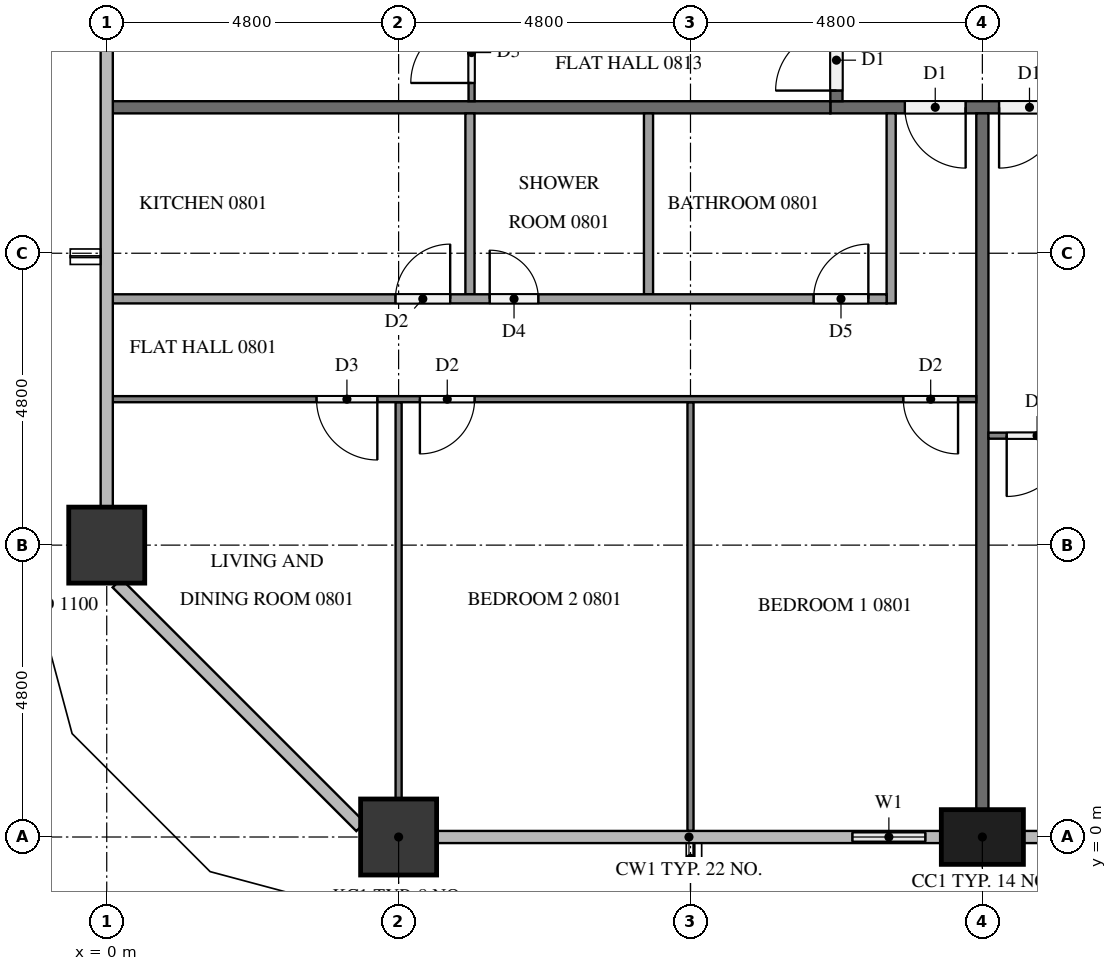
"""IFC4 building model, lengths in metres.
Left out: names, types, materials, properties, quantities, classifications, styles, units other than length and angle.
Written with IfcOpenShell. Run it as: python <this file> out.ifc"""

import sys

from ifc_helpers import new_model, si_unit, direction, frame, frame_2d, origin, origin_2d, place, context, subcontext, project, spatial, rectangle, extrude, element, fill, save


model = new_model("IFC4")
c1 = context("Model", 3, precision=1e-05, world=origin(), true_north=direction((0.0, 1.0)))
c2 = subcontext(c1, "Body", "Model", "MODEL_VIEW")
j1 = project(units=[si_unit("LENGTHUNIT", "METRE"), si_unit("PLANEANGLEUNIT", "RADIAN")], contexts=[c1])
p1 = place(None, origin())
s1 = spatial("IfcSite", under=j1, at=p1, CompositionType="ELEMENT")
p2 = place(p1, origin())
s2 = spatial("IfcBuilding", under=s1, at=p2, CompositionType="ELEMENT")
p3 = place(p2, frame((0.0, 0.0, 36.4)))
s3 = spatial("IfcBuildingStorey", under=s2, at=p3, CompositionType="ELEMENT", Elevation=36.4)
p4 = place(p3, frame((4.8, 0.0, 0.0), z_axis=(0.0, 0.0, 1.0), x_axis=(1.0, 0.0, 0.0)))
e1 = element("IfcColumn", 1, at=p4, inside=s3, PredefinedType="COLUMN", context=c2, shape_type="SweptSolid", body=[
    extrude(rectangle(XDim=1.25, YDim=1.25, at=origin_2d()), origin(), (0.0, 0.0, 1.0), 3.2),
])
p5 = place(p3, frame((14.4, 0.0, 0.0), z_axis=(0.0, 0.0, 1.0), x_axis=(1.0, 0.0, 0.0)))
e2 = element("IfcColumn", 2, at=p5, inside=s3, PredefinedType="COLUMN", context=c2, shape_type="SweptSolid", body=[
    extrude(rectangle(XDim=1.35, YDim=0.9, at=origin_2d()), origin(), (0.0, 0.0, 1.0), 3.2),
])
p6 = place(p3, frame((0.0, 4.8, 0.0), z_axis=(0.0, 0.0, 1.0), x_axis=(1.0, 0.0, 0.0)))
e3 = element("IfcColumn", 3, at=p6, inside=s3, PredefinedType="COLUMN", context=c2, shape_type="SweptSolid", body=[
    extrude(rectangle(XDim=1.25, YDim=1.25, at=origin_2d()), origin(), (0.0, 0.0, 1.0), 3.2),
])
p7 = place(p3, frame((12.0, 0.0, 0.0), z_axis=(0.0, 0.0, 1.0), x_axis=(1.0, 0.0, 0.0)))
e4 = element("IfcWall", 4, at=p7, inside=s3, PredefinedType="SOLIDWALL", context=c2, shape_type="SweptSolid", body=[
    extrude(rectangle(XDim=1.725, YDim=0.15, at=frame_2d((0.863, 0.0))), origin(), (0.0, 0.0, 1.0), 3.2),
])
p8 = place(p7, frame((0.262, 0.0, 0.9)))
e5 = element("IfcOpeningElement", 5, at=p8, cuts=e4, PredefinedType="OPENING", context=c2, shape_type="SweptSolid", body=[
    extrude(rectangle(XDim=1.2, YDim=1.4, at=frame_2d((0.6, 0.7))), frame((0.0, 0.085, 0.0), z_axis=(0.0, -1.0, 0.0), x_axis=(1.0, 0.0, 0.0)), (0.0, 0.0, 1.0), 0.17),
])
p9 = place(p3, frame((50.5, 12.0, 0.0), z_axis=(0.0, 0.0, 1.0), x_axis=(-1.0, 0.0, 0.0)))
e6 = element("IfcWall", 6, at=p9, inside=s3, PredefinedType="PARTITIONING", context=c2, shape_type="SweptSolid", body=[
    extrude(rectangle(XDim=38.6, YDim=0.2, at=frame_2d((19.3, 0.0))), origin(), (0.0, 0.0, 1.0), 3.2),
])
p10 = place(p9, frame((36.375, 0.0, 0.0)))
e7 = element("IfcOpeningElement", 7, at=p10, cuts=e6, PredefinedType="OPENING", context=c2, shape_type="SweptSolid", body=[
    extrude(rectangle(XDim=1.0, YDim=2.1, at=frame_2d((0.5, 1.05))), frame((0.0, 0.11, 0.0), z_axis=(0.0, -1.0, 0.0), x_axis=(1.0, 0.0, 0.0)), (0.0, 0.0, 1.0), 0.22),
])
p11 = place(p9, frame((34.825, 0.0, 0.0)))
e8 = element("IfcOpeningElement", 8, at=p11, cuts=e6, PredefinedType="OPENING", context=c2, shape_type="SweptSolid", body=[
    extrude(rectangle(XDim=1.0, YDim=2.1, at=frame_2d((0.5, 1.05))), frame((0.0, 0.11, 0.0), z_axis=(0.0, -1.0, 0.0), x_axis=(1.0, 0.0, 0.0)), (0.0, 0.0, 1.0), 0.22),
])
p12 = place(p9, frame((22.825, 0.0, 0.0)))
e9 = element("IfcOpeningElement", 9, at=p12, cuts=e6, PredefinedType="OPENING", context=c2, shape_type="SweptSolid", body=[
    extrude(rectangle(XDim=1.0, YDim=2.1, at=frame_2d((0.5, 1.05))), frame((0.0, 0.11, 0.0), z_axis=(0.0, -1.0, 0.0), x_axis=(1.0, 0.0, 0.0)), (0.0, 0.0, 1.0), 0.22),
])
p13 = place(p9, frame((8.425, 0.0, 0.0)))
e10 = element("IfcOpeningElement", 10, at=p13, cuts=e6, PredefinedType="OPENING", context=c2, shape_type="SweptSolid", body=[
    extrude(rectangle(XDim=1.0, YDim=2.1, at=frame_2d((0.5, 1.05))), frame((0.0, 0.11, 0.0), z_axis=(0.0, -1.0, 0.0), x_axis=(1.0, 0.0, 0.0)), (0.0, 0.0, 1.0), 0.22),
])
p14 = place(p9, frame((1.225, 0.0, 0.0)))
e11 = element("IfcOpeningElement", 11, at=p14, cuts=e6, PredefinedType="OPENING", context=c2, shape_type="SweptSolid", body=[
    extrude(rectangle(XDim=1.0, YDim=2.1, at=frame_2d((0.5, 1.05))), frame((0.0, 0.11, 0.0), z_axis=(0.0, -1.0, 0.0), x_axis=(1.0, 0.0, 0.0)), (0.0, 0.0, 1.0), 0.22),
])
p15 = place(p3, frame((12.0, 12.1, 0.0), z_axis=(0.0, 0.0, 1.0), x_axis=(0.0, 1.0, 0.0)))
e12 = element("IfcWall", 12, at=p15, inside=s3, PredefinedType="PARTITIONING", context=c2, shape_type="SweptSolid", body=[
    extrude(rectangle(XDim=28.6, YDim=0.2, at=frame_2d((14.3, 0.0))), origin(), (0.0, 0.0, 1.0), 3.2),
])
p16 = place(p15, frame((16.975, 0.0, 0.0)))
e13 = element("IfcOpeningElement", 13, at=p16, cuts=e12, PredefinedType="OPENING", context=c2, shape_type="SweptSolid", body=[
    extrude(rectangle(XDim=1.0, YDim=2.1, at=frame_2d((0.5, 1.05))), frame((0.0, 0.11, 0.0), z_axis=(0.0, -1.0, 0.0), x_axis=(1.0, 0.0, 0.0)), (0.0, 0.0, 1.0), 0.22),
])
p17 = place(p15, frame((0.175, 0.0, 0.0)))
e14 = element("IfcOpeningElement", 14, at=p17, cuts=e12, PredefinedType="OPENING", context=c2, shape_type="SweptSolid", body=[
    extrude(rectangle(XDim=1.0, YDim=2.1, at=frame_2d((0.5, 1.05))), frame((0.0, 0.11, 0.0), z_axis=(0.0, -1.0, 0.0), x_axis=(1.0, 0.0, 0.0)), (0.0, 0.0, 1.0), 0.22),
])
p18 = place(p3, frame((14.4, 11.9, 0.0), z_axis=(0.0, 0.0, 1.0), x_axis=(0.0, -1.0, 0.0)))
e15 = element("IfcWall", 15, at=p18, inside=s3, PredefinedType="PARTITIONING", context=c2, shape_type="SweptSolid", body=[
    extrude(rectangle(XDim=11.45, YDim=0.2, at=frame_2d((5.725, 0.0))), origin(), (0.0, 0.0, 1.0), 3.2),
])
p19 = place(p3, frame((0.1, 12.0, 0.0), z_axis=(0.0, 0.0, 1.0), x_axis=(1.0, 0.0, 0.0)))
e16 = element("IfcWall", 16, at=p19, inside=s3, PredefinedType="PARTITIONING", context=c2, shape_type="SweptSolid", body=[
    extrude(rectangle(XDim=11.8, YDim=0.2, at=frame_2d((5.9, 0.0))), origin(), (0.0, 0.0, 1.0), 3.2),
])
p20 = place(p3, frame((9.6, 7.15, 0.0), z_axis=(0.0, 0.0, 1.0), x_axis=(0.0, -1.0, 0.0)))
e17 = element("IfcWall", 17, at=p20, inside=s3, PredefinedType="PARTITIONING", context=c2, shape_type="SweptSolid", body=[
    extrude(rectangle(XDim=7.05, YDim=0.1, at=frame_2d((3.525, 0.0))), origin(), (0.0, 0.0, 1.0), 3.2),
])
p21 = place(p3, frame((4.8, 7.15, 0.0), z_axis=(0.0, 0.0, 1.0), x_axis=(0.0, -1.0, 0.0)))
e18 = element("IfcWall", 18, at=p21, inside=s3, PredefinedType="PARTITIONING", context=c2, shape_type="SweptSolid", body=[
    extrude(rectangle(XDim=6.525, YDim=0.1, at=frame_2d((3.262, 0.0))), origin(), (0.0, 0.0, 1.0), 3.2),
])
p22 = place(p3, frame((14.3, 7.2, 0.0), z_axis=(0.0, 0.0, 1.0), x_axis=(-1.0, 0.0, 0.0)))
e19 = element("IfcWall", 19, at=p22, inside=s3, PredefinedType="PARTITIONING", context=c2, shape_type="SweptSolid", body=[
    extrude(rectangle(XDim=14.2, YDim=0.1, at=frame_2d((7.1, 0.0))), origin(), (0.0, 0.0, 1.0), 3.2),
])
p23 = place(p22, frame((0.3, 0.0, 0.0)))
e20 = element("IfcOpeningElement", 20, at=p23, cuts=e19, PredefinedType="OPENING", context=c2, shape_type="SweptSolid", body=[
    extrude(rectangle(XDim=0.9, YDim=2.1, at=frame_2d((0.45, 1.05))), frame((0.0, 0.06, 0.0), z_axis=(0.0, -1.0, 0.0), x_axis=(1.0, 0.0, 0.0)), (0.0, 0.0, 1.0), 0.12),
])
p24 = place(p22, frame((8.25, 0.0, 0.0)))
e21 = element("IfcOpeningElement", 21, at=p24, cuts=e19, PredefinedType="OPENING", context=c2, shape_type="SweptSolid", body=[
    extrude(rectangle(XDim=0.9, YDim=2.1, at=frame_2d((0.45, 1.05))), frame((0.0, 0.06, 0.0), z_axis=(0.0, -1.0, 0.0), x_axis=(1.0, 0.0, 0.0)), (0.0, 0.0, 1.0), 0.12),
])
p25 = place(p22, frame((9.85, 0.0, 0.0)))
e22 = element("IfcOpeningElement", 22, at=p25, cuts=e19, PredefinedType="OPENING", context=c2, shape_type="SweptSolid", body=[
    extrude(rectangle(XDim=1.0, YDim=2.1, at=frame_2d((0.5, 1.05))), frame((0.0, 0.06, 0.0), z_axis=(0.0, -1.0, 0.0), x_axis=(1.0, 0.0, 0.0)), (0.0, 0.0, 1.0), 0.12),
])
for number, where, z_axis, x_axis in (
    (23, (8.91, 11.9, 0.0), (0.0, 0.0, 1.0), (0.0, -1.0, 0.0)),
    (24, (5.973, 11.9, 0.0), (0.0, 0.0, 1.0), (0.0, -1.0, 0.0)),
):
    element("IfcWall", number, at=place(p3, frame(where, z_axis=z_axis, x_axis=x_axis)), inside=s3, PredefinedType="PARTITIONING", context=c2, shape_type="SweptSolid", body=[
        extrude(rectangle(XDim=2.975, YDim=0.15, at=frame_2d((1.487, 0.0))), origin(), (0.0, 0.0, 1.0), 3.2),
    ])
p26 = place(p3, frame((12.9, 11.9, 0.0), z_axis=(0.0, 0.0, 1.0), x_axis=(0.0, -1.0, 0.0)))
e25 = element("IfcWall", 25, at=p26, inside=s3, PredefinedType="PARTITIONING", context=c2, shape_type="SweptSolid", body=[
    extrude(rectangle(XDim=3.125, YDim=0.15, at=frame_2d((1.562, 0.0))), origin(), (0.0, 0.0, 1.0), 3.2),
])
p27 = place(p3, frame((0.1, 8.85, 0.0), z_axis=(0.0, 0.0, 1.0), x_axis=(1.0, 0.0, 0.0)))
e26 = element("IfcWall", 26, at=p27, inside=s3, PredefinedType="PARTITIONING", context=c2, shape_type="SweptSolid", body=[
    extrude(rectangle(XDim=12.725, YDim=0.15, at=frame_2d((6.362, 0.0))), origin(), (0.0, 0.0, 1.0), 3.2),
])
p28 = place(p27, frame((11.525, 0.0, 0.0)))
e27 = element("IfcOpeningElement", 27, at=p28, cuts=e26, PredefinedType="OPENING", context=c2, shape_type="SweptSolid", body=[
    extrude(rectangle(XDim=0.9, YDim=2.1, at=frame_2d((0.45, 1.05))), frame((0.0, 0.085, 0.0), z_axis=(0.0, -1.0, 0.0), x_axis=(1.0, 0.0, 0.0)), (0.0, 0.0, 1.0), 0.17),
])
p29 = place(p27, frame((6.198, 0.0, 0.0)))
e28 = element("IfcOpeningElement", 28, at=p29, cuts=e26, PredefinedType="OPENING", context=c2, shape_type="SweptSolid", body=[
    extrude(rectangle(XDim=0.8, YDim=2.1, at=frame_2d((0.4, 1.05))), frame((0.0, 0.085, 0.0), z_axis=(0.0, -1.0, 0.0), x_axis=(1.0, 0.0, 0.0)), (0.0, 0.0, 1.0), 0.17),
])
p30 = place(p27, frame((4.648, 0.0, 0.0)))
e29 = element("IfcOpeningElement", 29, at=p30, cuts=e26, PredefinedType="OPENING", context=c2, shape_type="SweptSolid", body=[
    extrude(rectangle(XDim=0.9, YDim=2.1, at=frame_2d((0.45, 1.05))), frame((0.0, 0.085, 0.0), z_axis=(0.0, -1.0, 0.0), x_axis=(1.0, 0.0, 0.0)), (0.0, 0.0, 1.0), 0.17),
])
p31 = place(p3, frame((26.3, 6.6, 0.0), z_axis=(0.0, 0.0, 1.0), x_axis=(-1.0, 0.0, 0.0)))
e30 = element("IfcWall", 30, at=p31, inside=s3, PredefinedType="PARTITIONING", context=c2, shape_type="SweptSolid", body=[
    extrude(rectangle(XDim=11.8, YDim=0.1, at=frame_2d((5.9, 0.0))), origin(), (0.0, 0.0, 1.0), 3.2),
])
p32 = place(p31, frame((10.5, 0.0, 0.0)))
e31 = element("IfcOpeningElement", 31, at=p32, cuts=e30, PredefinedType="OPENING", context=c2, shape_type="SweptSolid", body=[
    extrude(rectangle(XDim=1.0, YDim=2.1, at=frame_2d((0.5, 1.05))), frame((0.0, 0.06, 0.0), z_axis=(0.0, -1.0, 0.0), x_axis=(1.0, 0.0, 0.0)), (0.0, 0.0, 1.0), 0.12),
])
p33 = place(p31, frame((0.3, 0.0, 0.0)))
e32 = element("IfcOpeningElement", 32, at=p33, cuts=e30, PredefinedType="OPENING", context=c2, shape_type="SweptSolid", body=[
    extrude(rectangle(XDim=0.9, YDim=2.1, at=frame_2d((0.45, 1.05))), frame((0.0, 0.06, 0.0), z_axis=(0.0, -1.0, 0.0), x_axis=(1.0, 0.0, 0.0)), (0.0, 0.0, 1.0), 0.12),
])
p34 = place(p3, frame((6.0, 12.1, 0.0), z_axis=(0.0, 0.0, 1.0), x_axis=(0.0, 1.0, 0.0)))
e33 = element("IfcWall", 33, at=p34, inside=s3, PredefinedType="PARTITIONING", context=c2, shape_type="SweptSolid", body=[
    extrude(rectangle(XDim=16.6, YDim=0.1, at=frame_2d((8.3, 0.0))), origin(), (0.0, 0.0, 1.0), 3.2),
])
p35 = place(p34, frame((0.3, 0.0, 0.0)))
e34 = element("IfcOpeningElement", 34, at=p35, cuts=e33, PredefinedType="OPENING", context=c2, shape_type="SweptSolid", body=[
    extrude(rectangle(XDim=1.0, YDim=2.1, at=frame_2d((0.5, 1.05))), frame((0.0, 0.06, 0.0), z_axis=(0.0, -1.0, 0.0), x_axis=(1.0, 0.0, 0.0)), (0.0, 0.0, 1.0), 0.12),
])
p36 = place(p34, frame((10.65, 0.0, 0.0)))
e35 = element("IfcOpeningElement", 35, at=p36, cuts=e33, PredefinedType="OPENING", context=c2, shape_type="SweptSolid", body=[
    extrude(rectangle(XDim=0.9, YDim=2.1, at=frame_2d((0.45, 1.05))), frame((0.0, 0.06, 0.0), z_axis=(0.0, -1.0, 0.0), x_axis=(1.0, 0.0, 0.0)), (0.0, 0.0, 1.0), 0.12),
])
p37 = place(p34, frame((12.25, 0.0, 0.0)))
e36 = element("IfcOpeningElement", 36, at=p37, cuts=e33, PredefinedType="OPENING", context=c2, shape_type="SweptSolid", body=[
    extrude(rectangle(XDim=0.9, YDim=2.1, at=frame_2d((0.45, 1.05))), frame((0.0, 0.06, 0.0), z_axis=(0.0, -1.0, 0.0), x_axis=(1.0, 0.0, 0.0)), (0.0, 0.0, 1.0), 0.12),
])
p38 = place(p8, origin())
e37 = element("IfcWindow", 37, at=p38, inside=s3, PartitioningType="SINGLE_PANEL", PredefinedType="WINDOW", context=c2, shape_type="SweptSolid", body=[
    extrude(rectangle(XDim=1.2, YDim=1.4, at=frame_2d((0.6, 0.7))), frame((0.0, 0.03, 0.0), z_axis=(0.0, -1.0, 0.0), x_axis=(1.0, 0.0, 0.0)), (0.0, 0.0, 1.0), 0.06),
])
fill(e5, e37)
p39 = place(p10, origin())
e38 = element("IfcDoor", 38, at=p39, inside=s3, OperationType="SINGLE_SWING_LEFT", PredefinedType="DOOR", context=c2, shape_type="SweptSolid", body=[
    extrude(rectangle(XDim=1.0, YDim=2.1, at=frame_2d((0.5, 1.05))), frame((0.0, 0.025, 0.0), z_axis=(0.0, -1.0, 0.0), x_axis=(1.0, 0.0, 0.0)), (0.0, 0.0, 1.0), 0.05),
])
fill(e7, e38)
p40 = place(p11, origin())
e39 = element("IfcDoor", 39, at=p40, inside=s3, OperationType="SINGLE_SWING_RIGHT", PredefinedType="DOOR", context=c2, shape_type="SweptSolid", body=[
    extrude(rectangle(XDim=1.0, YDim=2.1, at=frame_2d((0.5, 1.05))), frame((0.0, 0.025, 0.0), z_axis=(0.0, -1.0, 0.0), x_axis=(1.0, 0.0, 0.0)), (0.0, 0.0, 1.0), 0.05),
])
fill(e8, e39)
p41 = place(p17, origin())
e40 = element("IfcDoor", 40, at=p41, inside=s3, OperationType="SINGLE_SWING_LEFT", PredefinedType="DOOR", context=c2, shape_type="SweptSolid", body=[
    extrude(rectangle(XDim=1.0, YDim=2.1, at=frame_2d((0.5, 1.05))), frame((0.0, 0.025, 0.0), z_axis=(0.0, -1.0, 0.0), x_axis=(1.0, 0.0, 0.0)), (0.0, 0.0, 1.0), 0.05),
])
fill(e14, e40)
p42 = place(p23, origin())
e41 = element("IfcDoor", 41, at=p42, inside=s3, OperationType="SINGLE_SWING_LEFT", PredefinedType="DOOR", context=c2, shape_type="SweptSolid", body=[
    extrude(rectangle(XDim=0.9, YDim=2.1, at=frame_2d((0.45, 1.05))), frame((0.0, 0.025, 0.0), z_axis=(0.0, -1.0, 0.0), x_axis=(1.0, 0.0, 0.0)), (0.0, 0.0, 1.0), 0.05),
])
fill(e20, e41)
p43 = place(p24, origin())
e42 = element("IfcDoor", 42, at=p43, inside=s3, OperationType="SINGLE_SWING_RIGHT", PredefinedType="DOOR", context=c2, shape_type="SweptSolid", body=[
    extrude(rectangle(XDim=0.9, YDim=2.1, at=frame_2d((0.45, 1.05))), frame((0.0, 0.025, 0.0), z_axis=(0.0, -1.0, 0.0), x_axis=(1.0, 0.0, 0.0)), (0.0, 0.0, 1.0), 0.05),
])
fill(e21, e42)
p44 = place(p25, origin())
e43 = element("IfcDoor", 43, at=p44, inside=s3, OperationType="SINGLE_SWING_LEFT", PredefinedType="DOOR", context=c2, shape_type="SweptSolid", body=[
    extrude(rectangle(XDim=1.0, YDim=2.1, at=frame_2d((0.5, 1.05))), frame((0.0, 0.025, 0.0), z_axis=(0.0, -1.0, 0.0), x_axis=(1.0, 0.0, 0.0)), (0.0, 0.0, 1.0), 0.05),
])
fill(e22, e43)
p45 = place(p28, origin())
e44 = element("IfcDoor", 44, at=p45, inside=s3, OperationType="SINGLE_SWING_RIGHT", PredefinedType="DOOR", context=c2, shape_type="SweptSolid", body=[
    extrude(rectangle(XDim=0.9, YDim=2.1, at=frame_2d((0.45, 1.05))), frame((0.0, 0.025, 0.0), z_axis=(0.0, -1.0, 0.0), x_axis=(1.0, 0.0, 0.0)), (0.0, 0.0, 1.0), 0.05),
])
fill(e27, e44)
p46 = place(p29, origin())
e45 = element("IfcDoor", 45, at=p46, inside=s3, OperationType="SINGLE_SWING_LEFT", PredefinedType="DOOR", context=c2, shape_type="SweptSolid", body=[
    extrude(rectangle(XDim=0.8, YDim=2.1, at=frame_2d((0.4, 1.05))), frame((0.0, 0.025, 0.0), z_axis=(0.0, -1.0, 0.0), x_axis=(1.0, 0.0, 0.0)), (0.0, 0.0, 1.0), 0.05),
])
fill(e28, e45)
p47 = place(p30, origin())
e46 = element("IfcDoor", 46, at=p47, inside=s3, OperationType="SINGLE_SWING_RIGHT", PredefinedType="DOOR", context=c2, shape_type="SweptSolid", body=[
    extrude(rectangle(XDim=0.9, YDim=2.1, at=frame_2d((0.45, 1.05))), frame((0.0, 0.025, 0.0), z_axis=(0.0, -1.0, 0.0), x_axis=(1.0, 0.0, 0.0)), (0.0, 0.0, 1.0), 0.05),
])
fill(e29, e46)
p48 = place(p32, origin())
e47 = element("IfcDoor", 47, at=p48, inside=s3, OperationType="SINGLE_SWING_RIGHT", PredefinedType="DOOR", context=c2, shape_type="SweptSolid", body=[
    extrude(rectangle(XDim=1.0, YDim=2.1, at=frame_2d((0.5, 1.05))), frame((0.0, 0.025, 0.0), z_axis=(0.0, -1.0, 0.0), x_axis=(1.0, 0.0, 0.0)), (0.0, 0.0, 1.0), 0.05),
])
fill(e31, e47)
p49 = place(p35, origin())
e48 = element("IfcDoor", 48, at=p49, inside=s3, OperationType="SINGLE_SWING_LEFT", PredefinedType="DOOR", context=c2, shape_type="SweptSolid", body=[
    extrude(rectangle(XDim=1.0, YDim=2.1, at=frame_2d((0.5, 1.05))), frame((0.0, 0.025, 0.0), z_axis=(0.0, -1.0, 0.0), x_axis=(1.0, 0.0, 0.0)), (0.0, 0.0, 1.0), 0.05),
])
fill(e34, e48)
save(model, sys.argv[1])
